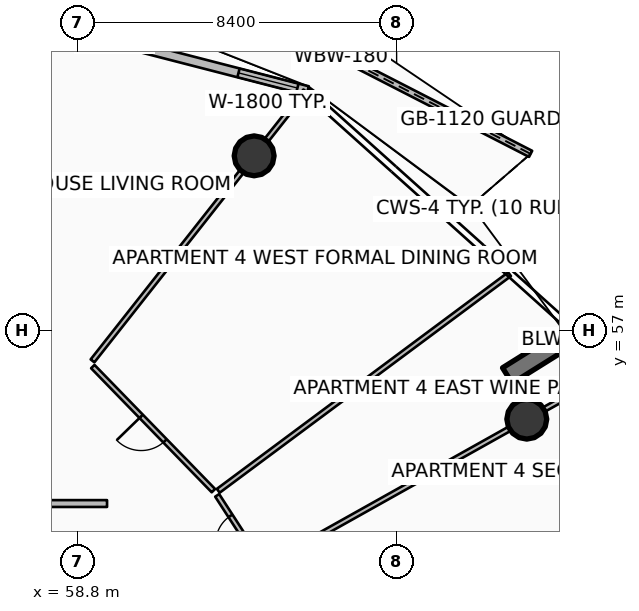
"""IFC4 building model, lengths in metres.
Left out: names, types, materials, properties, quantities, classifications, styles, units other than length and angle.
Written with IfcOpenShell. Run it as: python <this file> out.ifc"""

import sys

from ifc_helpers import new_model, si_unit, direction, frame, frame_2d, origin, origin_2d, place, context, subcontext, project, spatial, polyline, rectangle, circle, outline, extrude, element, fill, save


model = new_model("IFC4")
c1 = context("Model", 3, precision=1e-05, world=origin(), true_north=direction((0.0, 1.0)))
c2 = subcontext(c1, "Body", "Model", "MODEL_VIEW")
j1 = project(units=[si_unit("LENGTHUNIT", "METRE"), si_unit("PLANEANGLEUNIT", "RADIAN")], contexts=[c1])
p1 = place(None, origin())
s1 = spatial("IfcSite", under=j1, at=p1, CompositionType="ELEMENT")
p2 = place(p1, origin())
s2 = spatial("IfcBuilding", under=s1, at=p2, CompositionType="ELEMENT")
p3 = place(p2, frame((0.0, 0.0, 206.55)))
s3 = spatial("IfcBuildingStorey", under=s2, at=p3, CompositionType="ELEMENT", Elevation=206.55)
p4 = place(p3, frame((70.114, 55.818, 0.0), z_axis=(0.0, 0.0, 1.0), x_axis=(0.848033572426, 0.529942506352, 0.0)))
e1 = element("IfcWall", 1, at=p4, inside=s3, PredefinedType="SOLIDWALL", context=c2, shape_type="SweptSolid", body=[
    extrude(rectangle(XDim=3.5, YDim=0.48, at=frame_2d((1.75, 0.0))), origin(), (0.0, 0.0, 1.0), 3.75),
])
for number, where, z_axis, x_axis in (
    (2, (70.625, 54.671, 0.0), (0.0, 0.0, 1.0), (1.0, 0.0, 0.0)),
    (3, (63.451, 61.599, 0.0), (0.0, 0.0, 1.0), (1.0, 0.0, 0.0)),
):
    element("IfcColumn", number, at=place(p3, frame(where, z_axis=z_axis, x_axis=x_axis)), inside=s3, PredefinedType="COLUMN", context=c2, shape_type="SweptSolid", body=[
        extrude(circle(Radius=0.525, at=origin_2d()), origin(), (0.0, 0.0, 1.0), 3.5),
    ])
p5 = place(p3, frame((70.726, 61.651, 0.0), z_axis=(0.0, 0.0, 1.0), x_axis=(-0.889659107665, 0.456625308266, 0.0)))
e4 = element("IfcWall", 4, at=p5, inside=s3, PredefinedType="PARAPET", context=c2, shape_type="SweptSolid", body=[
    extrude(outline(polyline([(0.0, 0.0), (11.208, 0.0), (11.208, 1.148), (5.604, 1.284), (0.0, 1.483), (0.0, 0.0)])), frame((0.0, 0.09, 0.0), z_axis=(0.0, -1.0, 0.0), x_axis=(1.0, 0.0, 0.0)), (0.0, 0.0, 1.0), 0.18),
])
p6 = place(p3, frame((64.86, 63.313, 0.0), z_axis=(0.0, 0.0, 1.0), x_axis=(-0.968374028006, 0.249502989727, 0.0)))
e5 = element("IfcWall", 5, at=p6, inside=s3, PredefinedType="SOLIDWALL", context=c2, shape_type="SweptSolid", body=[
    extrude(rectangle(XDim=10.494, YDim=0.24, at=frame_2d((5.247, 0.0))), origin(), (0.0, 0.0, 1.0), 2.45),
])
p7 = place(p6, frame((8.274, 0.0, 0.0)))
e6 = element("IfcOpeningElement", 6, at=p7, cuts=e5, PredefinedType="OPENING", context=c2, shape_type="SweptSolid", body=[
    extrude(rectangle(XDim=1.45, YDim=2.15, at=frame_2d((0.725, 1.075))), frame((0.0, 0.13, 0.0), z_axis=(0.0, -1.0, 0.0), x_axis=(1.0, 0.0, 0.0)), (0.0, 0.0, 1.0), 0.26),
])
p8 = place(p6, frame((0.28, 0.0, 0.65)))
e7 = element("IfcOpeningElement", 7, at=p8, cuts=e5, PredefinedType="OPENING", context=c2, shape_type="SweptSolid", body=[
    extrude(rectangle(XDim=1.6, YDim=1.5, at=frame_2d((0.8, 0.75))), frame((0.0, 0.13, 0.0), z_axis=(0.0, -1.0, 0.0), x_axis=(1.0, 0.0, 0.0)), (0.0, 0.0, 1.0), 0.26),
])
p9 = place(p3, frame((64.859, 48.522, 0.0), z_axis=(0.0, 0.0, 1.0), x_axis=(0.93264258635, 0.360801616025, 0.0)))
e8 = element("IfcWall", 8, at=p9, inside=s3, PredefinedType="PARTITIONING", context=c2, shape_type="SweptSolid", body=[
    extrude(rectangle(XDim=9.323, YDim=0.125, at=frame_2d((4.662, 0.0))), origin(), (0.0, 0.0, 1.0), 2.94),
])
p10 = place(p3, frame((59.58, 52.45, 0.0), z_axis=(0.0, 0.0, 1.0), x_axis=(-1.0, 0.0, 0.0)))
e9 = element("IfcWall", 9, at=p10, inside=s3, PredefinedType="PARTITIONING", context=c2, shape_type="SweptSolid", body=[
    extrude(rectangle(XDim=3.222, YDim=0.18, at=frame_2d((1.611, 0.0))), origin(), (0.0, 0.0, 1.0), 2.94),
])
p11 = place(p3, frame((63.781, 50.838, 0.0), z_axis=(0.0, 0.0, 1.0), x_axis=(0.87249667769, 0.488620044022, 0.0)))
e10 = element("IfcWall", 10, at=p11, inside=s3, PredefinedType="PARTITIONING", context=c2, shape_type="SweptSolid", body=[
    extrude(rectangle(XDim=9.808, YDim=0.125, at=frame_2d((4.904, 0.0))), origin(), (0.0, 0.0, 1.0), 2.94),
])
p12 = place(p3, frame((59.198, 56.204, 0.0), z_axis=(0.0, 0.0, 1.0), x_axis=(0.619095305497, 0.785315861747, 0.0)))
e11 = element("IfcWall", 11, at=p12, inside=s3, PredefinedType="PARTITIONING", context=c2, shape_type="SweptSolid", body=[
    extrude(rectangle(XDim=9.043, YDim=0.125, at=frame_2d((4.521, 0.0))), origin(), (0.0, 0.0, 1.0), 2.94),
])
p13 = place(p3, frame((62.507, 52.786, 0.0), z_axis=(0.0, 0.0, 1.0), x_axis=(0.802514437248, 0.596632699413, 0.0)))
e12 = element("IfcWall", 12, at=p13, inside=s3, PredefinedType="PARTITIONING", context=c2, shape_type="SweptSolid", body=[
    extrude(rectangle(XDim=9.551, YDim=0.125, at=frame_2d((4.775, 0.0))), origin(), (0.0, 0.0, 1.0), 2.94),
])
p14 = place(p3, frame((63.639, 50.873, 0.0), z_axis=(0.0, 0.0, 1.0), x_axis=(-0.543701600377, 0.839278600792, 0.0)))
e13 = element("IfcWall", 13, at=p14, inside=s3, PredefinedType="PARTITIONING", context=c2, shape_type="SweptSolid", body=[
    extrude(rectangle(XDim=2.135, YDim=0.125, at=frame_2d((1.068, 0.0))), origin(), (0.0, 0.0, 1.0), 2.94),
])
p15 = place(p14, frame((0.643, 0.0, 0.0)))
e14 = element("IfcOpeningElement", 14, at=p15, cuts=e13, PredefinedType="OPENING", context=c2, shape_type="SweptSolid", body=[
    extrude(rectangle(XDim=0.85, YDim=2.06, at=frame_2d((0.425, 1.03))), frame((0.0, 0.073, 0.0), z_axis=(0.0, -1.0, 0.0), x_axis=(1.0, 0.0, 0.0)), (0.0, 0.0, 1.0), 0.145),
])
p16 = place(p3, frame((62.379, 52.789, 0.0), z_axis=(0.0, 0.0, 1.0), x_axis=(-0.697062312207, 0.717010552852, 0.0)))
e15 = element("IfcWall", 15, at=p16, inside=s3, PredefinedType="PARTITIONING", context=c2, shape_type="SweptSolid", body=[
    extrude(rectangle(XDim=4.553, YDim=0.125, at=frame_2d((2.276, 0.0))), origin(), (0.0, 0.0, 1.0), 2.94),
])
p17 = place(p16, frame((1.826, 0.0, 0.0)))
e16 = element("IfcOpeningElement", 16, at=p17, cuts=e15, PredefinedType="OPENING", context=c2, shape_type="SweptSolid", body=[
    extrude(rectangle(XDim=0.9, YDim=2.08, at=frame_2d((0.45, 1.04))), frame((0.0, 0.073, 0.0), z_axis=(0.0, -1.0, 0.0), x_axis=(1.0, 0.0, 0.0)), (0.0, 0.0, 1.0), 0.145),
])
p18 = place(p8, origin())
e17 = element("IfcWindow", 17, at=p18, inside=s3, PartitioningType="SINGLE_PANEL", PredefinedType="WINDOW", context=c2, shape_type="SweptSolid", body=[
    extrude(rectangle(XDim=1.6, YDim=1.5, at=frame_2d((0.8, 0.75))), frame((0.0, 0.03, 0.0), z_axis=(0.0, -1.0, 0.0), x_axis=(1.0, 0.0, 0.0)), (0.0, 0.0, 1.0), 0.06),
])
fill(e7, e17)
p19 = place(p15, origin())
e18 = element("IfcDoor", 18, at=p19, inside=s3, OperationType="SINGLE_SWING_LEFT", PredefinedType="DOOR", context=c2, shape_type="SweptSolid", body=[
    extrude(rectangle(XDim=0.85, YDim=2.06, at=frame_2d((0.425, 1.03))), frame((0.0, 0.025, 0.0), z_axis=(0.0, -1.0, 0.0), x_axis=(1.0, 0.0, 0.0)), (0.0, 0.0, 1.0), 0.05),
])
fill(e14, e18)
p20 = place(p17, origin())
e19 = element("IfcDoor", 19, at=p20, inside=s3, OperationType="SINGLE_SWING_RIGHT", PredefinedType="DOOR", context=c2, shape_type="SweptSolid", body=[
    extrude(rectangle(XDim=0.9, YDim=2.08, at=frame_2d((0.45, 1.04))), frame((0.0, 0.025, 0.0), z_axis=(0.0, -1.0, 0.0), x_axis=(1.0, 0.0, 0.0)), (0.0, 0.0, 1.0), 0.05),
])
fill(e16, e19)
save(model, sys.argv[1])
